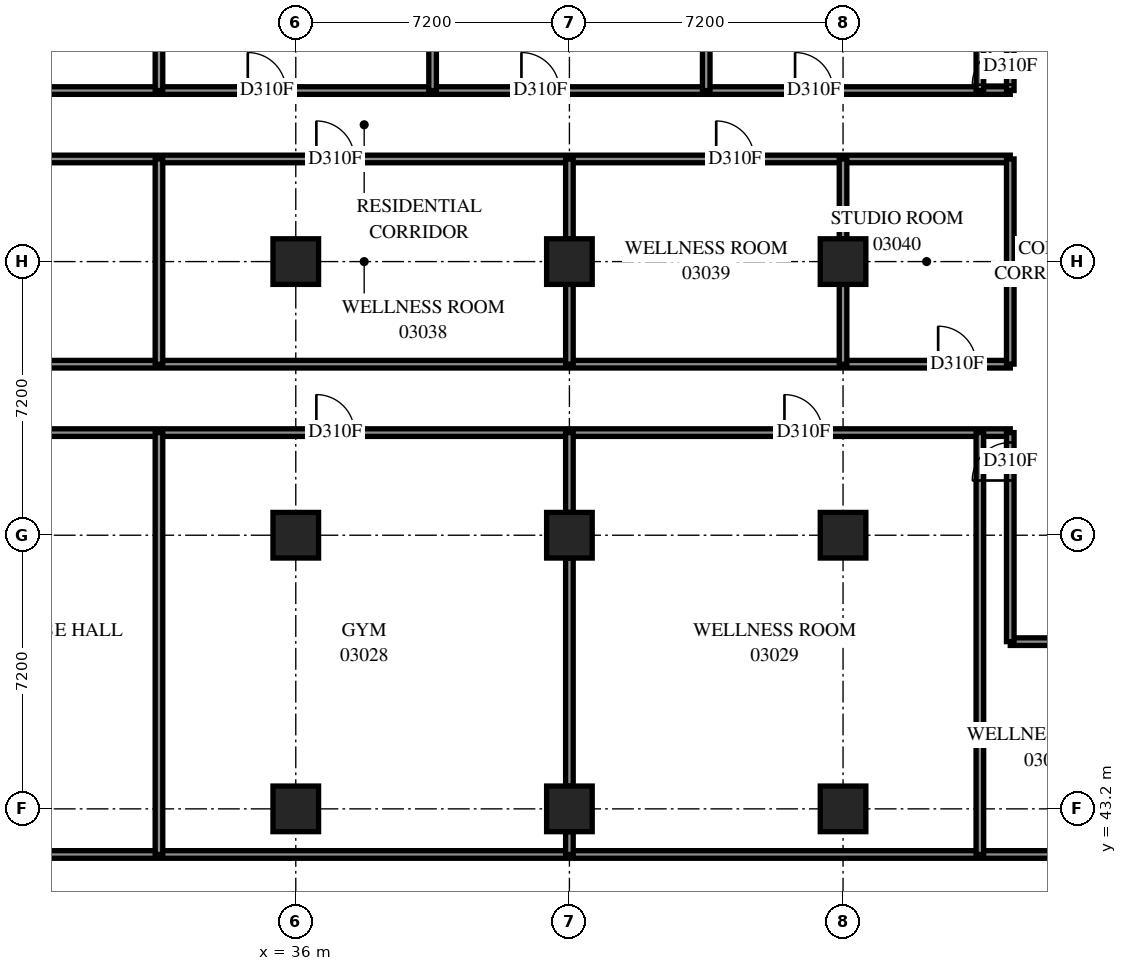
"""IFC4 building model, lengths in metres.
Left out: names, types, materials, properties, quantities, classifications, styles, units other than length and angle.
Written with IfcOpenShell. Run it as: python <this file> out.ifc"""

import sys

from ifc_helpers import new_model, si_unit, direction, frame, frame_2d, origin, origin_2d, place, context, subcontext, project, spatial, rectangle, extrude, element, fill, save


model = new_model("IFC4")
c1 = context("Model", 3, precision=1e-05, world=origin(), true_north=direction((0.0, 1.0)))
c2 = subcontext(c1, "Body", "Model", "MODEL_VIEW")
j1 = project(units=[si_unit("LENGTHUNIT", "METRE"), si_unit("PLANEANGLEUNIT", "RADIAN")], contexts=[c1])
p1 = place(None, origin())
s1 = spatial("IfcSite", under=j1, at=p1, CompositionType="ELEMENT")
p2 = place(p1, origin())
s2 = spatial("IfcBuilding", under=s1, at=p2, CompositionType="ELEMENT")
p3 = place(p2, frame((0.0, 0.0, 14.4)))
s3 = spatial("IfcBuildingStorey", under=s2, at=p3, CompositionType="ELEMENT", Elevation=14.4)
for number, where, z_axis, x_axis in (
    (1, (36.0, 43.2, 0.0), (0.0, 0.0, 1.0), (1.0, 0.0, 0.0)),
    (2, (36.0, 50.4, 0.0), (0.0, 0.0, 1.0), (1.0, 0.0, 0.0)),
    (3, (36.0, 57.6, 0.0), (0.0, 0.0, 1.0), (1.0, 0.0, 0.0)),
    (4, (43.2, 43.2, 0.0), (0.0, 0.0, 1.0), (1.0, 0.0, 0.0)),
    (5, (43.2, 50.4, 0.0), (0.0, 0.0, 1.0), (1.0, 0.0, 0.0)),
    (6, (43.2, 57.6, 0.0), (0.0, 0.0, 1.0), (1.0, 0.0, 0.0)),
    (7, (50.4, 43.2, 0.0), (0.0, 0.0, 1.0), (1.0, 0.0, 0.0)),
    (8, (50.4, 50.4, 0.0), (0.0, 0.0, 1.0), (1.0, 0.0, 0.0)),
    (9, (50.4, 57.6, 0.0), (0.0, 0.0, 1.0), (1.0, 0.0, 0.0)),
):
    element("IfcColumn", number, at=place(p3, frame(where, z_axis=z_axis, x_axis=x_axis)), inside=s3, PredefinedType="COLUMN", context=c2, shape_type="SweptSolid", body=[
        extrude(rectangle(XDim=1.2, YDim=1.2, at=origin_2d()), origin(), (0.0, 0.0, 1.0), 3.8),
    ])
p4 = place(p3, frame((13.75, 42.0, 0.0), z_axis=(0.0, 0.0, 1.0), x_axis=(1.0, 0.0, 0.0)))
e10 = element("IfcWall", 10, at=p4, inside=s3, PredefinedType="PARTITIONING", context=c2, shape_type="SweptSolid", body=[
    extrude(rectangle(XDim=58.9, YDim=0.2, at=frame_2d((29.45, 0.0))), origin(), (0.0, 0.0, 1.0), 3.8),
])
p5 = place(p3, frame((0.0, 54.9, 0.0), z_axis=(0.0, 0.0, 1.0), x_axis=(1.0, 0.0, 0.0)))
e11 = element("IfcWall", 11, at=p5, inside=s3, PredefinedType="PARTITIONING", context=c2, shape_type="SweptSolid", body=[
    extrude(rectangle(XDim=54.8, YDim=0.2, at=frame_2d((27.4, 0.0))), origin(), (0.0, 0.0, 1.0), 3.8),
])
p6 = place(p5, frame((10.485, 0.0, 0.0)))
e12 = element("IfcOpeningElement", 12, at=p6, cuts=e11, PredefinedType="OPENING", context=c2, shape_type="SweptSolid", body=[
    extrude(rectangle(XDim=1.0, YDim=2.1, at=frame_2d((0.5, 1.05))), frame((0.0, 0.11, 0.0), z_axis=(0.0, -1.0, 0.0), x_axis=(1.0, 0.0, 0.0)), (0.0, 0.0, 1.0), 0.22),
])
p7 = place(p5, frame((52.902, 0.0, 0.0)))
e13 = element("IfcOpeningElement", 13, at=p7, cuts=e11, PredefinedType="OPENING", context=c2, shape_type="SweptSolid", body=[
    extrude(rectangle(XDim=1.0, YDim=2.1, at=frame_2d((0.5, 1.05))), frame((0.0, 0.11, 0.0), z_axis=(0.0, -1.0, 0.0), x_axis=(1.0, 0.0, 0.0)), (0.0, 0.0, 1.0), 0.22),
])
p8 = place(p5, frame((2.268, 0.0, 0.0)))
e14 = element("IfcOpeningElement", 14, at=p8, cuts=e11, PredefinedType="OPENING", context=c2, shape_type="SweptSolid", body=[
    extrude(rectangle(XDim=1.0, YDim=2.1, at=frame_2d((0.5, 1.05))), frame((0.0, 0.11, 0.0), z_axis=(0.0, -1.0, 0.0), x_axis=(1.0, 0.0, 0.0)), (0.0, 0.0, 1.0), 0.22),
])
p9 = place(p3, frame((0.0, 53.1, 0.0), z_axis=(0.0, 0.0, 1.0), x_axis=(1.0, 0.0, 0.0)))
e15 = element("IfcWall", 15, at=p9, inside=s3, PredefinedType="PARTITIONING", context=c2, shape_type="SweptSolid", body=[
    extrude(rectangle(XDim=54.8, YDim=0.2, at=frame_2d((27.4, 0.0))), origin(), (0.0, 0.0, 1.0), 3.8),
])
p10 = place(p9, frame((8.669, 0.0, 0.0)))
e16 = element("IfcOpeningElement", 16, at=p10, cuts=e15, PredefinedType="OPENING", context=c2, shape_type="SweptSolid", body=[
    extrude(rectangle(XDim=1.0, YDim=2.1, at=frame_2d((0.5, 1.05))), frame((0.0, 0.11, 0.0), z_axis=(0.0, -1.0, 0.0), x_axis=(1.0, 0.0, 0.0)), (0.0, 0.0, 1.0), 0.22),
])
p11 = place(p9, frame((11.307, 0.0, 0.0)))
e17 = element("IfcOpeningElement", 17, at=p11, cuts=e15, PredefinedType="OPENING", context=c2, shape_type="SweptSolid", body=[
    extrude(rectangle(XDim=1.0, YDim=2.1, at=frame_2d((0.5, 1.05))), frame((0.0, 0.11, 0.0), z_axis=(0.0, -1.0, 0.0), x_axis=(1.0, 0.0, 0.0)), (0.0, 0.0, 1.0), 0.22),
])
p12 = place(p9, frame((20.058, 0.0, 0.0)))
e18 = element("IfcOpeningElement", 18, at=p12, cuts=e15, PredefinedType="OPENING", context=c2, shape_type="SweptSolid", body=[
    extrude(rectangle(XDim=1.0, YDim=2.1, at=frame_2d((0.5, 1.05))), frame((0.0, 0.11, 0.0), z_axis=(0.0, -1.0, 0.0), x_axis=(1.0, 0.0, 0.0)), (0.0, 0.0, 1.0), 0.22),
])
p13 = place(p9, frame((27.538, 0.0, 0.0)))
e19 = element("IfcOpeningElement", 19, at=p13, cuts=e15, PredefinedType="OPENING", context=c2, shape_type="SweptSolid", body=[
    extrude(rectangle(XDim=1.0, YDim=2.1, at=frame_2d((0.5, 1.05))), frame((0.0, 0.11, 0.0), z_axis=(0.0, -1.0, 0.0), x_axis=(1.0, 0.0, 0.0)), (0.0, 0.0, 1.0), 0.22),
])
p14 = place(p9, frame((36.542, 0.0, 0.0)))
e20 = element("IfcOpeningElement", 20, at=p14, cuts=e15, PredefinedType="OPENING", context=c2, shape_type="SweptSolid", body=[
    extrude(rectangle(XDim=1.0, YDim=2.1, at=frame_2d((0.5, 1.05))), frame((0.0, 0.11, 0.0), z_axis=(0.0, -1.0, 0.0), x_axis=(1.0, 0.0, 0.0)), (0.0, 0.0, 1.0), 0.22),
])
p15 = place(p9, frame((48.858, 0.0, 0.0)))
e21 = element("IfcOpeningElement", 21, at=p15, cuts=e15, PredefinedType="OPENING", context=c2, shape_type="SweptSolid", body=[
    extrude(rectangle(XDim=1.0, YDim=2.1, at=frame_2d((0.5, 1.05))), frame((0.0, 0.11, 0.0), z_axis=(0.0, -1.0, 0.0), x_axis=(1.0, 0.0, 0.0)), (0.0, 0.0, 1.0), 0.22),
])
p16 = place(p9, frame((2.522, 0.0, 0.0)))
e22 = element("IfcOpeningElement", 22, at=p16, cuts=e15, PredefinedType="OPENING", context=c2, shape_type="SweptSolid", body=[
    extrude(rectangle(XDim=1.0, YDim=2.1, at=frame_2d((0.5, 1.05))), frame((0.0, 0.11, 0.0), z_axis=(0.0, -1.0, 0.0), x_axis=(1.0, 0.0, 0.0)), (0.0, 0.0, 1.0), 0.22),
])
p17 = place(p9, frame((4.79, 0.0, 0.0)))
e23 = element("IfcOpeningElement", 23, at=p17, cuts=e15, PredefinedType="OPENING", context=c2, shape_type="SweptSolid", body=[
    extrude(rectangle(XDim=1.0, YDim=2.1, at=frame_2d((0.5, 1.05))), frame((0.0, 0.11, 0.0), z_axis=(0.0, -1.0, 0.0), x_axis=(1.0, 0.0, 0.0)), (0.0, 0.0, 1.0), 0.22),
])
p18 = place(p3, frame((0.002, 60.3, 0.0), z_axis=(0.0, 0.0, 1.0), x_axis=(1.0, 0.0, 0.0)))
e24 = element("IfcWall", 24, at=p18, inside=s3, PredefinedType="PARTITIONING", context=c2, shape_type="SweptSolid", body=[
    extrude(rectangle(XDim=54.798, YDim=0.2, at=frame_2d((27.399, 0.0))), origin(), (0.0, 0.0, 1.0), 3.8),
])
p19 = place(p18, frame((18.261, 0.0, 0.0)))
e25 = element("IfcOpeningElement", 25, at=p19, cuts=e24, PredefinedType="OPENING", context=c2, shape_type="SweptSolid", body=[
    extrude(rectangle(XDim=1.0, YDim=2.1, at=frame_2d((0.5, 1.05))), frame((0.0, 0.11, 0.0), z_axis=(0.0, -1.0, 0.0), x_axis=(1.0, 0.0, 0.0)), (0.0, 0.0, 1.0), 0.22),
])
p20 = place(p18, frame((27.256, 0.0, 0.0)))
e26 = element("IfcOpeningElement", 26, at=p20, cuts=e24, PredefinedType="OPENING", context=c2, shape_type="SweptSolid", body=[
    extrude(rectangle(XDim=1.0, YDim=2.1, at=frame_2d((0.5, 1.05))), frame((0.0, 0.11, 0.0), z_axis=(0.0, -1.0, 0.0), x_axis=(1.0, 0.0, 0.0)), (0.0, 0.0, 1.0), 0.22),
])
p21 = place(p18, frame((36.54, 0.0, 0.0)))
e27 = element("IfcOpeningElement", 27, at=p21, cuts=e24, PredefinedType="OPENING", context=c2, shape_type="SweptSolid", body=[
    extrude(rectangle(XDim=1.0, YDim=2.1, at=frame_2d((0.5, 1.05))), frame((0.0, 0.11, 0.0), z_axis=(0.0, -1.0, 0.0), x_axis=(1.0, 0.0, 0.0)), (0.0, 0.0, 1.0), 0.22),
])
p22 = place(p18, frame((47.06, 0.0, 0.0)))
e28 = element("IfcOpeningElement", 28, at=p22, cuts=e24, PredefinedType="OPENING", context=c2, shape_type="SweptSolid", body=[
    extrude(rectangle(XDim=1.0, YDim=2.1, at=frame_2d((0.5, 1.05))), frame((0.0, 0.11, 0.0), z_axis=(0.0, -1.0, 0.0), x_axis=(1.0, 0.0, 0.0)), (0.0, 0.0, 1.0), 0.22),
])
p23 = place(p18, frame((3.898, 0.0, 0.0)))
e29 = element("IfcOpeningElement", 29, at=p23, cuts=e24, PredefinedType="OPENING", context=c2, shape_type="SweptSolid", body=[
    extrude(rectangle(XDim=1.0, YDim=2.1, at=frame_2d((0.5, 1.05))), frame((0.0, 0.11, 0.0), z_axis=(0.0, -1.0, 0.0), x_axis=(1.0, 0.0, 0.0)), (0.0, 0.0, 1.0), 0.22),
])
p24 = place(p3, frame((0.002, 62.1, 0.0), z_axis=(0.0, 0.0, 1.0), x_axis=(1.0, 0.0, 0.0)))
e30 = element("IfcWall", 30, at=p24, inside=s3, PredefinedType="PARTITIONING", context=c2, shape_type="SweptSolid", body=[
    extrude(rectangle(XDim=54.798, YDim=0.2, at=frame_2d((27.399, 0.0))), origin(), (0.0, 0.0, 1.0), 3.8),
])
p25 = place(p24, frame((8.667, 0.0, 0.0)))
e31 = element("IfcOpeningElement", 31, at=p25, cuts=e30, PredefinedType="OPENING", context=c2, shape_type="SweptSolid", body=[
    extrude(rectangle(XDim=1.0, YDim=2.1, at=frame_2d((0.5, 1.05))), frame((0.0, 0.11, 0.0), z_axis=(0.0, -1.0, 0.0), x_axis=(1.0, 0.0, 0.0)), (0.0, 0.0, 1.0), 0.22),
])
p26 = place(p24, frame((13.136, 0.0, 0.0)))
e32 = element("IfcOpeningElement", 32, at=p26, cuts=e30, PredefinedType="OPENING", context=c2, shape_type="SweptSolid", body=[
    extrude(rectangle(XDim=1.0, YDim=2.1, at=frame_2d((0.5, 1.05))), frame((0.0, 0.11, 0.0), z_axis=(0.0, -1.0, 0.0), x_axis=(1.0, 0.0, 0.0)), (0.0, 0.0, 1.0), 0.22),
])
p27 = place(p24, frame((20.335, 0.0, 0.0)))
e33 = element("IfcOpeningElement", 33, at=p27, cuts=e30, PredefinedType="OPENING", context=c2, shape_type="SweptSolid", body=[
    extrude(rectangle(XDim=1.0, YDim=2.1, at=frame_2d((0.5, 1.05))), frame((0.0, 0.11, 0.0), z_axis=(0.0, -1.0, 0.0), x_axis=(1.0, 0.0, 0.0)), (0.0, 0.0, 1.0), 0.22),
])
p28 = place(p24, frame((27.535, 0.0, 0.0)))
e34 = element("IfcOpeningElement", 34, at=p28, cuts=e30, PredefinedType="OPENING", context=c2, shape_type="SweptSolid", body=[
    extrude(rectangle(XDim=1.0, YDim=2.1, at=frame_2d((0.5, 1.05))), frame((0.0, 0.11, 0.0), z_axis=(0.0, -1.0, 0.0), x_axis=(1.0, 0.0, 0.0)), (0.0, 0.0, 1.0), 0.22),
])
p29 = place(p24, frame((34.736, 0.0, 0.0)))
e35 = element("IfcOpeningElement", 35, at=p29, cuts=e30, PredefinedType="OPENING", context=c2, shape_type="SweptSolid", body=[
    extrude(rectangle(XDim=1.0, YDim=2.1, at=frame_2d((0.5, 1.05))), frame((0.0, 0.11, 0.0), z_axis=(0.0, -1.0, 0.0), x_axis=(1.0, 0.0, 0.0)), (0.0, 0.0, 1.0), 0.22),
])
p30 = place(p24, frame((41.935, 0.0, 0.0)))
e36 = element("IfcOpeningElement", 36, at=p30, cuts=e30, PredefinedType="OPENING", context=c2, shape_type="SweptSolid", body=[
    extrude(rectangle(XDim=1.0, YDim=2.1, at=frame_2d((0.5, 1.05))), frame((0.0, 0.11, 0.0), z_axis=(0.0, -1.0, 0.0), x_axis=(1.0, 0.0, 0.0)), (0.0, 0.0, 1.0), 0.22),
])
p31 = place(p24, frame((49.136, 0.0, 0.0)))
e37 = element("IfcOpeningElement", 37, at=p31, cuts=e30, PredefinedType="OPENING", context=c2, shape_type="SweptSolid", body=[
    extrude(rectangle(XDim=1.0, YDim=2.1, at=frame_2d((0.5, 1.05))), frame((0.0, 0.11, 0.0), z_axis=(0.0, -1.0, 0.0), x_axis=(1.0, 0.0, 0.0)), (0.0, 0.0, 1.0), 0.22),
])
p32 = place(p24, frame((4.799, 0.0, 0.0)))
e38 = element("IfcOpeningElement", 38, at=p32, cuts=e30, PredefinedType="OPENING", context=c2, shape_type="SweptSolid", body=[
    extrude(rectangle(XDim=1.0, YDim=2.1, at=frame_2d((0.5, 1.05))), frame((0.0, 0.11, 0.0), z_axis=(0.0, -1.0, 0.0), x_axis=(1.0, 0.0, 0.0)), (0.0, 0.0, 1.0), 0.22),
])
p33 = place(p3, frame((54.8, 47.6, 0.0), z_axis=(0.0, 0.0, 1.0), x_axis=(1.0, 0.0, 0.0)))
e39 = element("IfcWall", 39, at=p33, inside=s3, PredefinedType="PARTITIONING", context=c2, shape_type="SweptSolid", body=[
    extrude(rectangle(XDim=19.384, YDim=0.2, at=frame_2d((9.692, 0.0))), origin(), (0.0, 0.0, 1.0), 3.8),
])
p34 = place(p33, frame((8.458, 0.0, 0.0)))
e40 = element("IfcOpeningElement", 40, at=p34, cuts=e39, PredefinedType="OPENING", context=c2, shape_type="SweptSolid", body=[
    extrude(rectangle(XDim=1.0, YDim=2.1, at=frame_2d((0.5, 1.05))), frame((0.0, 0.11, 0.0), z_axis=(0.0, -1.0, 0.0), x_axis=(1.0, 0.0, 0.0)), (0.0, 0.0, 1.0), 0.22),
])
p35 = place(p33, frame((14.107, 0.0, 0.0)))
e41 = element("IfcOpeningElement", 41, at=p35, cuts=e39, PredefinedType="OPENING", context=c2, shape_type="SweptSolid", body=[
    extrude(rectangle(XDim=1.0, YDim=2.1, at=frame_2d((0.5, 1.05))), frame((0.0, 0.11, 0.0), z_axis=(0.0, -1.0, 0.0), x_axis=(1.0, 0.0, 0.0)), (0.0, 0.0, 1.0), 0.22),
])
for number, where, z_axis, x_axis in (
    (42, (32.4, 42.0, 0.0), (0.0, 0.0, 1.0), (0.0, 1.0, 0.0)),
    (43, (54.0, 42.0, 0.0), (0.0, 0.0, 1.0), (0.0, 1.0, 0.0)),
):
    element("IfcWall", number, at=place(p3, frame(where, z_axis=z_axis, x_axis=x_axis)), inside=s3, PredefinedType="PARTITIONING", context=c2, shape_type="SweptSolid", body=[
        extrude(rectangle(XDim=11.1, YDim=0.2, at=frame_2d((5.55, 0.0))), origin(), (0.0, 0.0, 1.0), 3.8),
    ])
for number, where, z_axis, x_axis in (
    (44, (32.4, 62.1, 0.0), (0.0, 0.0, 1.0), (0.0, 1.0, 0.0)),
    (45, (39.6, 62.1, 0.0), (0.0, 0.0, 1.0), (0.0, 1.0, 0.0)),
    (46, (46.8, 62.1, 0.0), (0.0, 0.0, 1.0), (0.0, 1.0, 0.0)),
    (47, (54.0, 62.1, 0.0), (0.0, 0.0, 1.0), (0.0, 1.0, 0.0)),
):
    element("IfcWall", number, at=place(p3, frame(where, z_axis=z_axis, x_axis=x_axis)), inside=s3, PredefinedType="PARTITIONING", context=c2, shape_type="SweptSolid", body=[
        extrude(rectangle(XDim=10.55, YDim=0.2, at=frame_2d((5.275, 0.0))), origin(), (0.0, 0.0, 1.0), 3.8),
    ])
p36 = place(p3, frame((43.2, 43.8, 0.0), z_axis=(0.0, 0.0, 1.0), x_axis=(0.0, 1.0, 0.0)))
e48 = element("IfcWall", 48, at=p36, inside=s3, PredefinedType="PARTITIONING", context=c2, shape_type="SweptSolid", body=[
    extrude(rectangle(XDim=6.0, YDim=0.2, at=frame_2d((3.0, 0.0))), origin(), (0.0, 0.0, 1.0), 3.8),
])
p37 = place(p3, frame((54.8, 47.6, 0.0), z_axis=(0.0, 0.0, 1.0), x_axis=(0.0, 1.0, 0.0)))
e49 = element("IfcWall", 49, at=p37, inside=s3, PredefinedType="PARTITIONING", context=c2, shape_type="SweptSolid", body=[
    extrude(rectangle(XDim=5.5, YDim=0.2, at=frame_2d((2.75, 0.0))), origin(), (0.0, 0.0, 1.0), 3.8),
])
p38 = place(p37, frame((4.24, 0.0, 0.0)))
e50 = element("IfcOpeningElement", 50, at=p38, cuts=e49, PredefinedType="OPENING", context=c2, shape_type="SweptSolid", body=[
    extrude(rectangle(XDim=1.0, YDim=2.1, at=frame_2d((0.5, 1.05))), frame((0.0, 0.11, 0.0), z_axis=(0.0, -1.0, 0.0), x_axis=(1.0, 0.0, 0.0)), (0.0, 0.0, 1.0), 0.22),
])
p39 = place(p3, frame((54.8, 62.102, 0.0), z_axis=(0.0, 0.0, 1.0), x_axis=(0.0, 1.0, 0.0)))
e51 = element("IfcWall", 51, at=p39, inside=s3, PredefinedType="PARTITIONING", context=c2, shape_type="SweptSolid", body=[
    extrude(rectangle(XDim=5.498, YDim=0.2, at=frame_2d((2.749, 0.0))), origin(), (0.0, 0.0, 1.0), 3.8),
])
p40 = place(p39, frame((0.152, 0.0, 0.0)))
e52 = element("IfcOpeningElement", 52, at=p40, cuts=e51, PredefinedType="OPENING", context=c2, shape_type="SweptSolid", body=[
    extrude(rectangle(XDim=1.0, YDim=2.1, at=frame_2d((0.5, 1.05))), frame((0.0, 0.11, 0.0), z_axis=(0.0, -1.0, 0.0), x_axis=(1.0, 0.0, 0.0)), (0.0, 0.0, 1.0), 0.22),
])
p41 = place(p3, frame((32.4, 54.9, 0.0), z_axis=(0.0, 0.0, 1.0), x_axis=(0.0, 1.0, 0.0)))
e53 = element("IfcWall", 53, at=p41, inside=s3, PredefinedType="PARTITIONING", context=c2, shape_type="SweptSolid", body=[
    extrude(rectangle(XDim=5.4, YDim=0.2, at=frame_2d((2.7, 0.0))), origin(), (0.0, 0.0, 1.0), 3.8),
])
p42 = place(p3, frame((54.8, 54.902, 0.0), z_axis=(0.0, 0.0, 1.0), x_axis=(0.0, 1.0, 0.0)))
e54 = element("IfcWall", 54, at=p42, inside=s3, PredefinedType="PARTITIONING", context=c2, shape_type="SweptSolid", body=[
    extrude(rectangle(XDim=5.398, YDim=0.2, at=frame_2d((2.699, 0.0))), origin(), (0.0, 0.0, 1.0), 3.8),
])
for number, where, z_axis, x_axis in (
    (55, (43.2, 51.0, 0.0), (0.0, 0.0, 1.0), (0.0, 1.0, 0.0)),
    (56, (43.2, 54.9, 0.0), (0.0, 0.0, 1.0), (0.0, 1.0, 0.0)),
    (57, (50.4, 54.9, 0.0), (0.0, 0.0, 1.0), (0.0, 1.0, 0.0)),
    (58, (43.2, 58.2, 0.0), (0.0, 0.0, 1.0), (0.0, 1.0, 0.0)),
    (59, (50.4, 58.2, 0.0), (0.0, 0.0, 1.0), (0.0, 1.0, 0.0)),
):
    element("IfcWall", number, at=place(p3, frame(where, z_axis=z_axis, x_axis=x_axis)), inside=s3, PredefinedType="PARTITIONING", context=c2, shape_type="SweptSolid", body=[
        extrude(rectangle(XDim=2.1, YDim=0.2, at=frame_2d((1.05, 0.0))), origin(), (0.0, 0.0, 1.0), 3.8),
    ])
p43 = place(p3, frame((43.2, 42.0, 0.0), z_axis=(0.0, 0.0, 1.0), x_axis=(0.0, 1.0, 0.0)))
e60 = element("IfcWall", 60, at=p43, inside=s3, PredefinedType="PARTITIONING", context=c2, shape_type="SweptSolid", body=[
    extrude(rectangle(XDim=0.6, YDim=0.2, at=frame_2d((0.3, 0.0))), origin(), (0.0, 0.0, 1.0), 3.8),
])
p44 = place(p14, origin())
e61 = element("IfcDoor", 61, at=p44, inside=s3, OperationType="SINGLE_SWING_RIGHT", PredefinedType="DOOR", context=c2, shape_type="SweptSolid", body=[
    extrude(rectangle(XDim=1.0, YDim=2.1, at=frame_2d((0.5, 1.05))), frame((0.0, 0.025, 0.0), z_axis=(0.0, -1.0, 0.0), x_axis=(1.0, 0.0, 0.0)), (0.0, 0.0, 1.0), 0.05),
])
fill(e20, e61)
p45 = place(p15, origin())
e62 = element("IfcDoor", 62, at=p45, inside=s3, OperationType="SINGLE_SWING_LEFT", PredefinedType="DOOR", context=c2, shape_type="SweptSolid", body=[
    extrude(rectangle(XDim=1.0, YDim=2.1, at=frame_2d((0.5, 1.05))), frame((0.0, 0.025, 0.0), z_axis=(0.0, -1.0, 0.0), x_axis=(1.0, 0.0, 0.0)), (0.0, 0.0, 1.0), 0.05),
])
fill(e21, e62)
p46 = place(p38, origin())
e63 = element("IfcDoor", 63, at=p46, inside=s3, OperationType="SINGLE_SWING_RIGHT", PredefinedType="DOOR", context=c2, shape_type="SweptSolid", body=[
    extrude(rectangle(XDim=1.0, YDim=2.1, at=frame_2d((0.5, 1.05))), frame((0.0, 0.025, 0.0), z_axis=(0.0, -1.0, 0.0), x_axis=(1.0, 0.0, 0.0)), (0.0, 0.0, 1.0), 0.05),
])
fill(e50, e63)
p47 = place(p21, origin())
e64 = element("IfcDoor", 64, at=p47, inside=s3, OperationType="SINGLE_SWING_RIGHT", PredefinedType="DOOR", context=c2, shape_type="SweptSolid", body=[
    extrude(rectangle(XDim=1.0, YDim=2.1, at=frame_2d((0.5, 1.05))), frame((0.0, 0.025, 0.0), z_axis=(0.0, -1.0, 0.0), x_axis=(1.0, 0.0, 0.0)), (0.0, 0.0, 1.0), 0.05),
])
fill(e27, e64)
p48 = place(p22, origin())
e65 = element("IfcDoor", 65, at=p48, inside=s3, OperationType="SINGLE_SWING_LEFT", PredefinedType="DOOR", context=c2, shape_type="SweptSolid", body=[
    extrude(rectangle(XDim=1.0, YDim=2.1, at=frame_2d((0.5, 1.05))), frame((0.0, 0.025, 0.0), z_axis=(0.0, -1.0, 0.0), x_axis=(1.0, 0.0, 0.0)), (0.0, 0.0, 1.0), 0.05),
])
fill(e28, e65)
p49 = place(p7, origin())
e66 = element("IfcDoor", 66, at=p49, inside=s3, OperationType="SINGLE_SWING_RIGHT", PredefinedType="DOOR", context=c2, shape_type="SweptSolid", body=[
    extrude(rectangle(XDim=1.0, YDim=2.1, at=frame_2d((0.5, 1.05))), frame((0.0, 0.025, 0.0), z_axis=(0.0, -1.0, 0.0), x_axis=(1.0, 0.0, 0.0)), (0.0, 0.0, 1.0), 0.05),
])
fill(e13, e66)
p50 = place(p29, origin())
e67 = element("IfcDoor", 67, at=p50, inside=s3, OperationType="SINGLE_SWING_LEFT", PredefinedType="DOOR", context=c2, shape_type="SweptSolid", body=[
    extrude(rectangle(XDim=1.0, YDim=2.1, at=frame_2d((0.5, 1.05))), frame((0.0, 0.025, 0.0), z_axis=(0.0, -1.0, 0.0), x_axis=(1.0, 0.0, 0.0)), (0.0, 0.0, 1.0), 0.05),
])
fill(e35, e67)
p51 = place(p30, origin())
e68 = element("IfcDoor", 68, at=p51, inside=s3, OperationType="SINGLE_SWING_LEFT", PredefinedType="DOOR", context=c2, shape_type="SweptSolid", body=[
    extrude(rectangle(XDim=1.0, YDim=2.1, at=frame_2d((0.5, 1.05))), frame((0.0, 0.025, 0.0), z_axis=(0.0, -1.0, 0.0), x_axis=(1.0, 0.0, 0.0)), (0.0, 0.0, 1.0), 0.05),
])
fill(e36, e68)
p52 = place(p31, origin())
e69 = element("IfcDoor", 69, at=p52, inside=s3, OperationType="SINGLE_SWING_LEFT", PredefinedType="DOOR", context=c2, shape_type="SweptSolid", body=[
    extrude(rectangle(XDim=1.0, YDim=2.1, at=frame_2d((0.5, 1.05))), frame((0.0, 0.025, 0.0), z_axis=(0.0, -1.0, 0.0), x_axis=(1.0, 0.0, 0.0)), (0.0, 0.0, 1.0), 0.05),
])
fill(e37, e69)
p53 = place(p40, origin())
e70 = element("IfcDoor", 70, at=p53, inside=s3, OperationType="SINGLE_SWING_LEFT", PredefinedType="DOOR", context=c2, shape_type="SweptSolid", body=[
    extrude(rectangle(XDim=1.0, YDim=2.1, at=frame_2d((0.5, 1.05))), frame((0.0, 0.025, 0.0), z_axis=(0.0, -1.0, 0.0), x_axis=(1.0, 0.0, 0.0)), (0.0, 0.0, 1.0), 0.05),
])
fill(e52, e70)
save(model, sys.argv[1])
